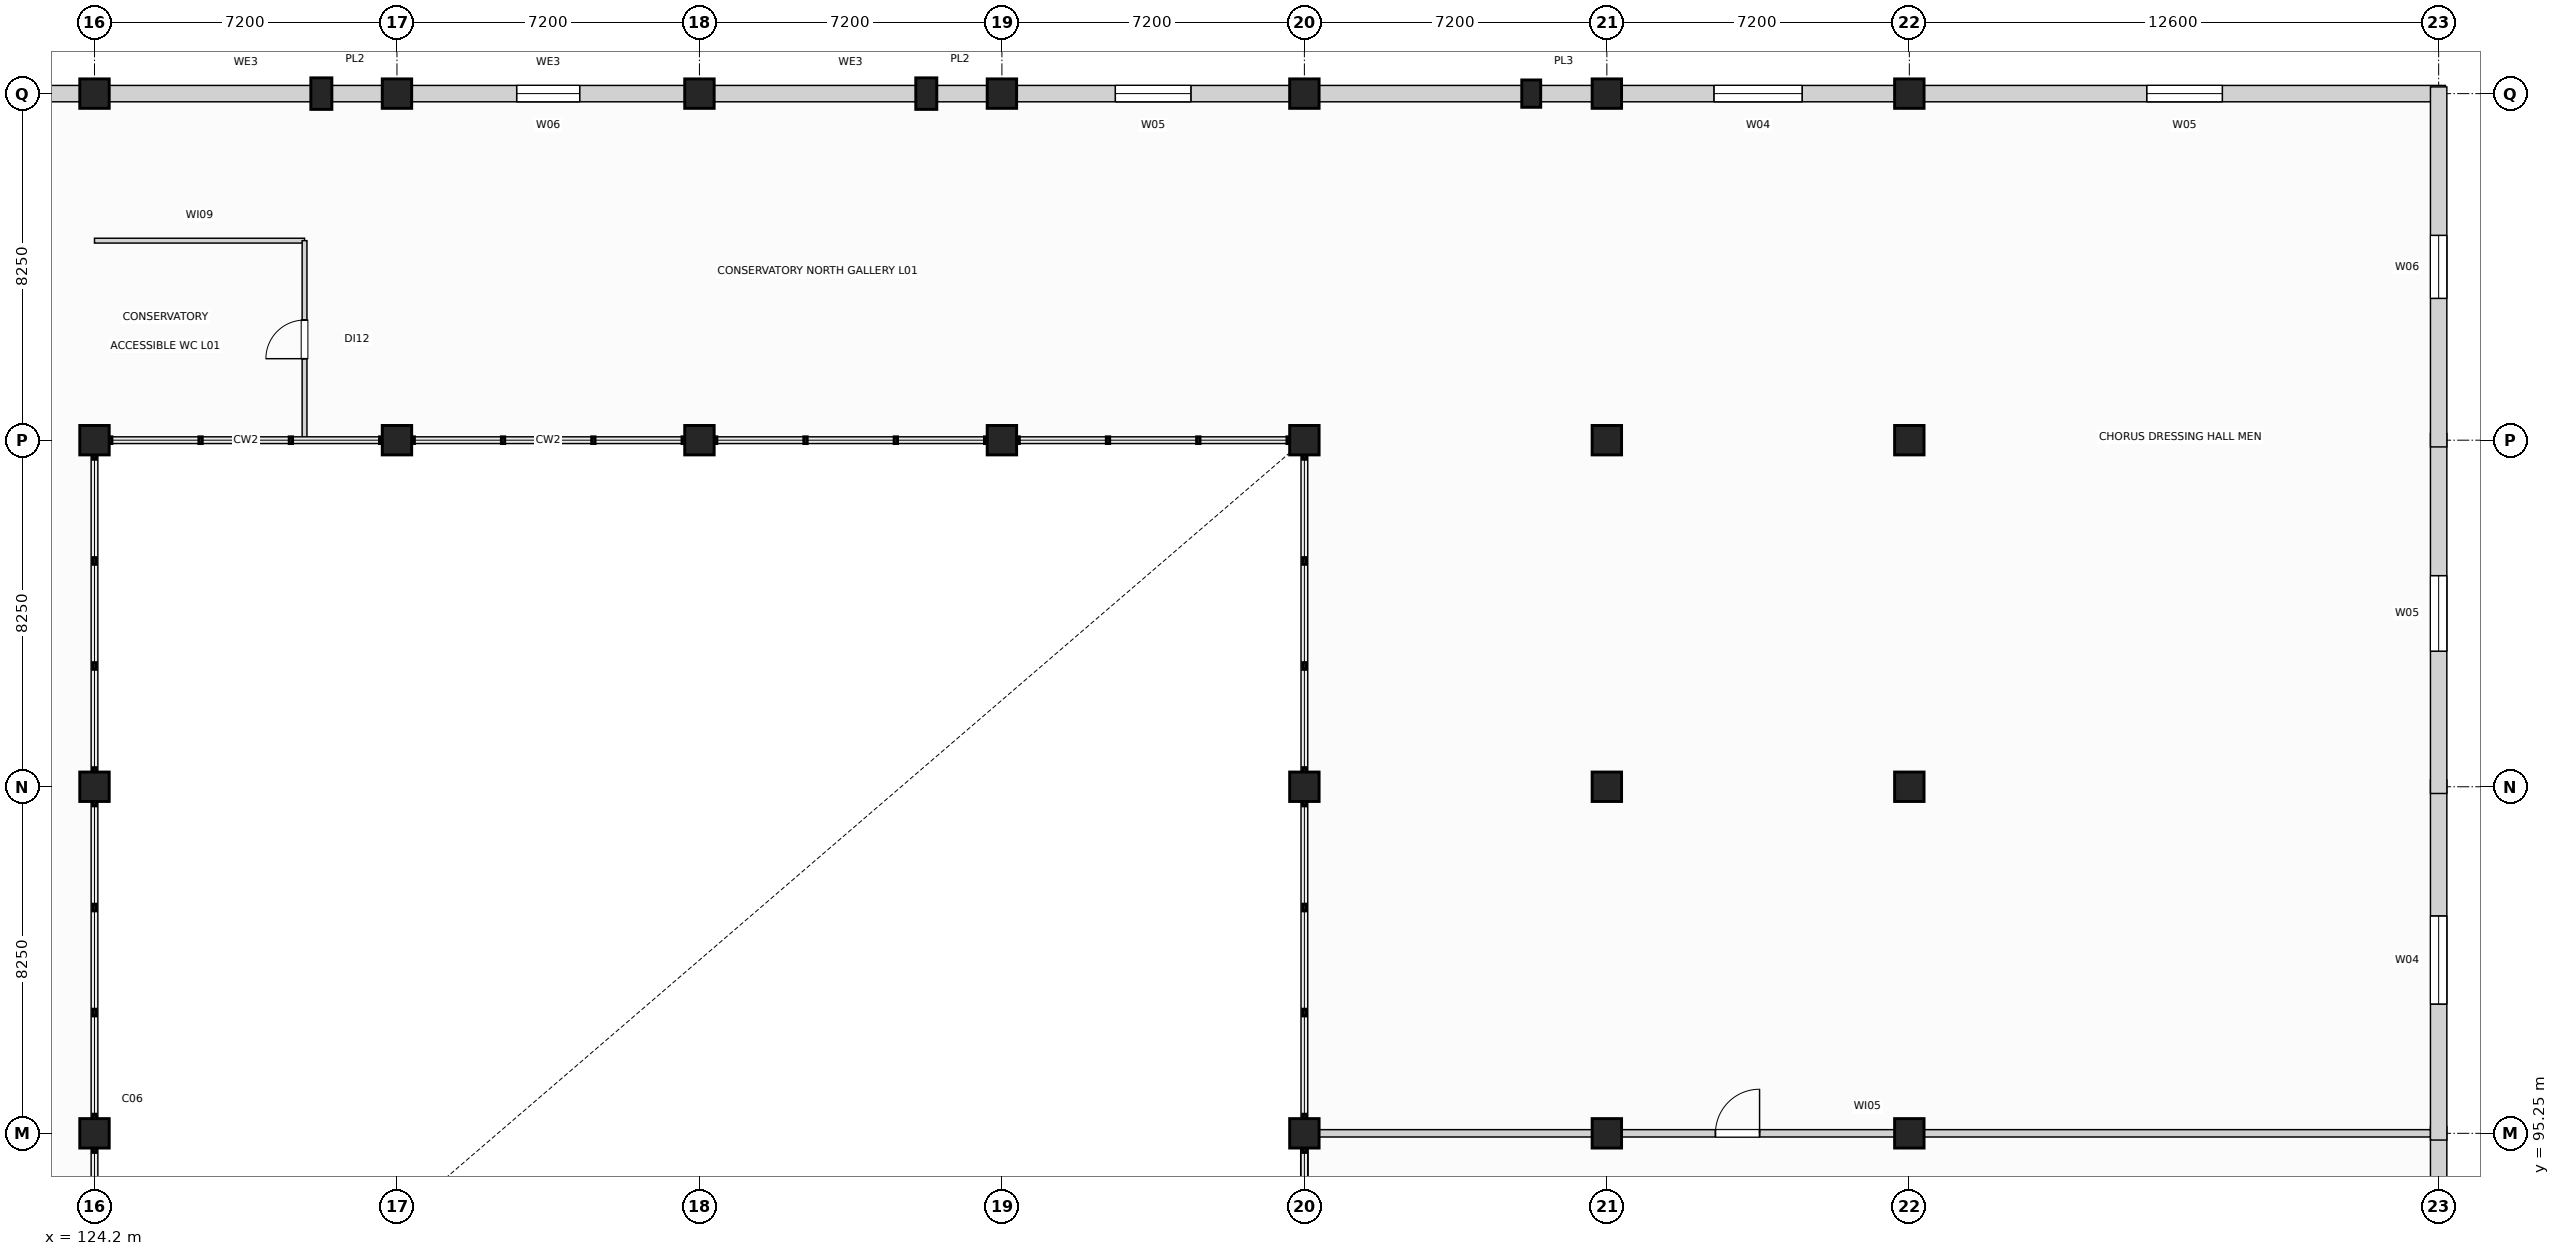
"""IFC4 building model, lengths in metres.
Left out: names, types, materials, properties, quantities, classifications, styles, units other than length and angle.
Written with IfcOpenShell. Run it as: python <this file> out.ifc"""

import sys

from ifc_helpers import new_model, si_unit, direction, frame, frame_2d, origin, origin_2d, place, context, subcontext, project, spatial, rectangle, extrude, element, fill, save


model = new_model("IFC4")
c1 = context("Model", 3, precision=1e-05, world=origin(), true_north=direction((0.0, 1.0)))
c2 = subcontext(c1, "Body", "Model", "MODEL_VIEW")
j1 = project(units=[si_unit("LENGTHUNIT", "METRE"), si_unit("PLANEANGLEUNIT", "RADIAN")], contexts=[c1])
p1 = place(None, origin())
s1 = spatial("IfcSite", under=j1, at=p1, CompositionType="ELEMENT")
p2 = place(p1, origin())
s2 = spatial("IfcBuilding", under=s1, at=p2, CompositionType="ELEMENT")
p3 = place(p2, frame((0.0, 0.0, 6.0)))
s3 = spatial("IfcBuildingStorey", under=s2, at=p3, CompositionType="ELEMENT", Elevation=6.0)
for number, where, z_axis, x_axis in (
    (1, (124.2, 95.25, 0.0), (0.0, 0.0, 1.0), (1.0, 0.0, 0.0)),
    (2, (124.2, 103.5, 0.0), (0.0, 0.0, 1.0), (1.0, 0.0, 0.0)),
    (3, (124.2, 111.75, 0.0), (0.0, 0.0, 1.0), (1.0, 0.0, 0.0)),
    (4, (124.2, 120.0, 0.0), (0.0, 0.0, 1.0), (1.0, 0.0, 0.0)),
    (5, (131.4, 111.75, 0.0), (0.0, 0.0, 1.0), (1.0, 0.0, 0.0)),
    (6, (131.4, 120.0, 0.0), (0.0, 0.0, 1.0), (1.0, 0.0, 0.0)),
    (7, (138.6, 111.75, 0.0), (0.0, 0.0, 1.0), (1.0, 0.0, 0.0)),
    (8, (138.6, 120.0, 0.0), (0.0, 0.0, 1.0), (1.0, 0.0, 0.0)),
    (9, (145.8, 111.75, 0.0), (0.0, 0.0, 1.0), (1.0, 0.0, 0.0)),
    (10, (145.8, 120.0, 0.0), (0.0, 0.0, 1.0), (1.0, 0.0, 0.0)),
    (11, (153.0, 95.25, 0.0), (0.0, 0.0, 1.0), (1.0, 0.0, 0.0)),
    (12, (153.0, 103.5, 0.0), (0.0, 0.0, 1.0), (1.0, 0.0, 0.0)),
    (13, (153.0, 111.75, 0.0), (0.0, 0.0, 1.0), (1.0, 0.0, 0.0)),
    (14, (153.0, 120.0, 0.0), (0.0, 0.0, 1.0), (1.0, 0.0, 0.0)),
    (15, (160.2, 95.25, 0.0), (0.0, 0.0, 1.0), (1.0, 0.0, 0.0)),
    (16, (160.2, 103.5, 0.0), (0.0, 0.0, 1.0), (1.0, 0.0, 0.0)),
    (17, (160.2, 111.75, 0.0), (0.0, 0.0, 1.0), (1.0, 0.0, 0.0)),
    (18, (160.2, 120.0, 0.0), (0.0, 0.0, 1.0), (1.0, 0.0, 0.0)),
    (19, (167.4, 95.25, 0.0), (0.0, 0.0, 1.0), (1.0, 0.0, 0.0)),
    (20, (167.4, 103.5, 0.0), (0.0, 0.0, 1.0), (1.0, 0.0, 0.0)),
    (21, (167.4, 111.75, 0.0), (0.0, 0.0, 1.0), (1.0, 0.0, 0.0)),
    (22, (167.4, 120.0, 0.0), (0.0, 0.0, 1.0), (1.0, 0.0, 0.0)),
):
    element("IfcColumn", number, at=place(p3, frame(where, z_axis=z_axis, x_axis=x_axis)), inside=s3, PredefinedType="COLUMN", context=c2, shape_type="SweptSolid", body=[
        extrude(rectangle(XDim=0.7, YDim=0.7, at=origin_2d()), origin(), (0.0, 0.0, 1.0), 5.4),
    ])
for number, where, z_axis, x_axis in (
    (23, (129.6, 120.0, 0.0), (0.0, 0.0, 1.0), (1.0, 0.0, 0.0)),
    (24, (144.0, 120.0, 0.0), (0.0, 0.0, 1.0), (1.0, 0.0, 0.0)),
):
    element("IfcColumn", number, at=place(p3, frame(where, z_axis=z_axis, x_axis=x_axis)), inside=s3, PredefinedType="PILASTER", context=c2, shape_type="SweptSolid", body=[
        extrude(rectangle(XDim=0.5, YDim=0.75, at=origin_2d()), origin(), (0.0, 0.0, 1.0), 5.05),
    ])
p4 = place(p3, frame((158.4, 120.0, 0.0), z_axis=(0.0, 0.0, 1.0), x_axis=(1.0, 0.0, 0.0)))
e25 = element("IfcColumn", 25, at=p4, inside=s3, PredefinedType="PILASTER", context=c2, shape_type="SweptSolid", body=[
    extrude(rectangle(XDim=0.45, YDim=0.65, at=origin_2d()), origin(), (0.0, 0.0, 1.0), 5.05),
])
p5 = place(p3, frame((117.345, 120.0, 0.0), z_axis=(0.0, 0.0, 1.0), x_axis=(1.0, 0.0, 0.0)))
e26 = element("IfcWall", 26, at=p5, inside=s3, PredefinedType="SOLIDWALL", context=c2, shape_type="SweptSolid", body=[
    extrude(rectangle(XDim=6.51, YDim=0.39, at=frame_2d((3.255, 0.0))), origin(), (0.0, 0.0, 1.0), 4.365),
])
p6 = place(p5, frame((2.205, 0.0, 0.9)))
e27 = element("IfcOpeningElement", 27, at=p6, cuts=e26, PredefinedType="OPENING", context=c2, shape_type="SweptSolid", body=[
    extrude(rectangle(XDim=2.1, YDim=2.5, at=frame_2d((1.05, 1.25))), frame((0.0, 0.205, 0.0), z_axis=(0.0, -1.0, 0.0), x_axis=(1.0, 0.0, 0.0)), (0.0, 0.0, 1.0), 0.41),
])
p7 = place(p3, frame((124.545, 120.0, 0.0), z_axis=(0.0, 0.0, 1.0), x_axis=(1.0, 0.0, 0.0)))
e28 = element("IfcWall", 28, at=p7, inside=s3, PredefinedType="SOLIDWALL", context=c2, shape_type="SweptSolid", body=[
    extrude(rectangle(XDim=6.51, YDim=0.39, at=frame_2d((3.255, 0.0))), origin(), (0.0, 0.0, 1.0), 4.365),
])
p8 = place(p3, frame((131.745, 120.0, 0.0), z_axis=(0.0, 0.0, 1.0), x_axis=(1.0, 0.0, 0.0)))
e29 = element("IfcWall", 29, at=p8, inside=s3, PredefinedType="SOLIDWALL", context=c2, shape_type="SweptSolid", body=[
    extrude(rectangle(XDim=6.51, YDim=0.39, at=frame_2d((3.255, 0.0))), origin(), (0.0, 0.0, 1.0), 4.265),
])
p9 = place(p8, frame((2.505, 0.0, 0.9)))
e30 = element("IfcOpeningElement", 30, at=p9, cuts=e29, PredefinedType="OPENING", context=c2, shape_type="SweptSolid", body=[
    extrude(rectangle(XDim=1.5, YDim=2.05, at=frame_2d((0.75, 1.025))), frame((0.0, 0.205, 0.0), z_axis=(0.0, -1.0, 0.0), x_axis=(1.0, 0.0, 0.0)), (0.0, 0.0, 1.0), 0.41),
])
p10 = place(p3, frame((138.945, 120.0, 0.0), z_axis=(0.0, 0.0, 1.0), x_axis=(1.0, 0.0, 0.0)))
e31 = element("IfcWall", 31, at=p10, inside=s3, PredefinedType="SOLIDWALL", context=c2, shape_type="SweptSolid", body=[
    extrude(rectangle(XDim=6.51, YDim=0.39, at=frame_2d((3.255, 0.0))), origin(), (0.0, 0.0, 1.0), 4.265),
])
p11 = place(p3, frame((146.145, 120.0, 0.0), z_axis=(0.0, 0.0, 1.0), x_axis=(1.0, 0.0, 0.0)))
e32 = element("IfcWall", 32, at=p11, inside=s3, PredefinedType="SOLIDWALL", context=c2, shape_type="SweptSolid", body=[
    extrude(rectangle(XDim=6.51, YDim=0.39, at=frame_2d((3.255, 0.0))), origin(), (0.0, 0.0, 1.0), 4.415),
])
p12 = place(p11, frame((2.355, 0.0, 0.9)))
e33 = element("IfcOpeningElement", 33, at=p12, cuts=e32, PredefinedType="OPENING", context=c2, shape_type="SweptSolid", body=[
    extrude(rectangle(XDim=1.8, YDim=2.3, at=frame_2d((0.9, 1.15))), frame((0.0, 0.205, 0.0), z_axis=(0.0, -1.0, 0.0), x_axis=(1.0, 0.0, 0.0)), (0.0, 0.0, 1.0), 0.41),
])
p13 = place(p3, frame((153.345, 120.0, 0.0), z_axis=(0.0, 0.0, 1.0), x_axis=(1.0, 0.0, 0.0)))
e34 = element("IfcWall", 34, at=p13, inside=s3, PredefinedType="SOLIDWALL", context=c2, shape_type="SweptSolid", body=[
    extrude(rectangle(XDim=6.51, YDim=0.39, at=frame_2d((3.255, 0.0))), origin(), (0.0, 0.0, 1.0), 4.065),
])
p14 = place(p3, frame((160.545, 120.0, 0.0), z_axis=(0.0, 0.0, 1.0), x_axis=(1.0, 0.0, 0.0)))
e35 = element("IfcWall", 35, at=p14, inside=s3, PredefinedType="SOLIDWALL", context=c2, shape_type="SweptSolid", body=[
    extrude(rectangle(XDim=6.51, YDim=0.39, at=frame_2d((3.255, 0.0))), origin(), (0.0, 0.0, 1.0), 4.065),
])
p15 = place(p14, frame((2.205, 0.0, 0.9)))
e36 = element("IfcOpeningElement", 36, at=p15, cuts=e35, PredefinedType="OPENING", context=c2, shape_type="SweptSolid", body=[
    extrude(rectangle(XDim=2.1, YDim=2.5, at=frame_2d((1.05, 1.25))), frame((0.0, 0.205, 0.0), z_axis=(0.0, -1.0, 0.0), x_axis=(1.0, 0.0, 0.0)), (0.0, 0.0, 1.0), 0.41),
])
p16 = place(p3, frame((167.745, 120.0, 0.0), z_axis=(0.0, 0.0, 1.0), x_axis=(1.0, 0.0, 0.0)))
e37 = element("IfcWall", 37, at=p16, inside=s3, PredefinedType="SOLIDWALL", context=c2, shape_type="SweptSolid", body=[
    extrude(rectangle(XDim=12.415, YDim=0.39, at=frame_2d((6.208, 0.0))), origin(), (0.0, 0.0, 1.0), 4.065),
])
p17 = place(p16, frame((5.307, 0.0, 0.9)))
e38 = element("IfcOpeningElement", 38, at=p17, cuts=e37, PredefinedType="OPENING", context=c2, shape_type="SweptSolid", body=[
    extrude(rectangle(XDim=1.8, YDim=2.3, at=frame_2d((0.9, 1.15))), frame((0.0, 0.205, 0.0), z_axis=(0.0, -1.0, 0.0), x_axis=(1.0, 0.0, 0.0)), (0.0, 0.0, 1.0), 0.41),
])
p18 = place(p3, frame((180.0, 95.41, 0.0), z_axis=(0.0, 0.0, 1.0), x_axis=(0.0, -1.0, 0.0)))
e39 = element("IfcWall", 39, at=p18, inside=s3, PredefinedType="SOLIDWALL", context=c2, shape_type="SweptSolid", body=[
    extrude(rectangle(XDim=8.57, YDim=0.39, at=frame_2d((4.285, 0.0))), origin(), (0.0, 0.0, 1.0), 5.015),
])
p19 = place(p18, frame((3.535, 0.0, 0.9)))
e40 = element("IfcOpeningElement", 40, at=p19, cuts=e39, PredefinedType="OPENING", context=c2, shape_type="SweptSolid", body=[
    extrude(rectangle(XDim=1.5, YDim=2.05, at=frame_2d((0.75, 1.025))), frame((0.0, 0.205, 0.0), z_axis=(0.0, -1.0, 0.0), x_axis=(1.0, 0.0, 0.0)), (0.0, 0.0, 1.0), 0.41),
])
p20 = place(p3, frame((180.0, 103.66, 0.0), z_axis=(0.0, 0.0, 1.0), x_axis=(0.0, -1.0, 0.0)))
e41 = element("IfcWall", 41, at=p20, inside=s3, PredefinedType="SOLIDWALL", context=c2, shape_type="SweptSolid", body=[
    extrude(rectangle(XDim=8.57, YDim=0.39, at=frame_2d((4.285, 0.0))), origin(), (0.0, 0.0, 1.0), 5.015),
])
p21 = place(p20, frame((3.235, 0.0, 0.9)))
e42 = element("IfcOpeningElement", 42, at=p21, cuts=e41, PredefinedType="OPENING", context=c2, shape_type="SweptSolid", body=[
    extrude(rectangle(XDim=2.1, YDim=2.5, at=frame_2d((1.05, 1.25))), frame((0.0, 0.205, 0.0), z_axis=(0.0, -1.0, 0.0), x_axis=(1.0, 0.0, 0.0)), (0.0, 0.0, 1.0), 0.41),
])
p22 = place(p3, frame((180.0, 111.91, 0.0), z_axis=(0.0, 0.0, 1.0), x_axis=(0.0, -1.0, 0.0)))
e43 = element("IfcWall", 43, at=p22, inside=s3, PredefinedType="SOLIDWALL", context=c2, shape_type="SweptSolid", body=[
    extrude(rectangle(XDim=8.57, YDim=0.39, at=frame_2d((4.285, 0.0))), origin(), (0.0, 0.0, 1.0), 5.015),
])
p23 = place(p22, frame((3.385, 0.0, 0.9)))
e44 = element("IfcOpeningElement", 44, at=p23, cuts=e43, PredefinedType="OPENING", context=c2, shape_type="SweptSolid", body=[
    extrude(rectangle(XDim=1.8, YDim=2.3, at=frame_2d((0.9, 1.15))), frame((0.0, 0.205, 0.0), z_axis=(0.0, -1.0, 0.0), x_axis=(1.0, 0.0, 0.0)), (0.0, 0.0, 1.0), 0.41),
])
p24 = place(p3, frame((180.0, 120.16, 0.0), z_axis=(0.0, 0.0, 1.0), x_axis=(0.0, -1.0, 0.0)))
e45 = element("IfcWall", 45, at=p24, inside=s3, PredefinedType="SOLIDWALL", context=c2, shape_type="SweptSolid", body=[
    extrude(rectangle(XDim=8.57, YDim=0.39, at=frame_2d((4.285, 0.0))), origin(), (0.0, 0.0, 1.0), 5.015),
])
p25 = place(p24, frame((3.535, 0.0, 0.9)))
e46 = element("IfcOpeningElement", 46, at=p25, cuts=e45, PredefinedType="OPENING", context=c2, shape_type="SweptSolid", body=[
    extrude(rectangle(XDim=1.5, YDim=2.05, at=frame_2d((0.75, 1.025))), frame((0.0, 0.205, 0.0), z_axis=(0.0, -1.0, 0.0), x_axis=(1.0, 0.0, 0.0)), (0.0, 0.0, 1.0), 0.41),
])
p26 = place(p3, frame((153.0, 69.2, 0.0), z_axis=(0.0, 0.0, 1.0), x_axis=(0.0, 1.0, 0.0)))
e47 = element("IfcWall", 47, at=p26, inside=s3, PredefinedType="PARTITIONING", context=c2, shape_type="SweptSolid", body=[
    extrude(rectangle(XDim=26.05, YDim=0.175, at=frame_2d((13.025, 0.0))), origin(), (0.0, 0.0, 1.0), 4.315),
])
p27 = place(p26, frame((12.5, 0.0, 0.0)))
e48 = element("IfcOpeningElement", 48, at=p27, cuts=e47, PredefinedType="OPENING", context=c2, shape_type="SweptSolid", body=[
    extrude(rectangle(XDim=1.05, YDim=2.12, at=frame_2d((0.525, 1.06))), frame((0.0, 0.097, 0.0), z_axis=(0.0, -1.0, 0.0), x_axis=(1.0, 0.0, 0.0)), (0.0, 0.0, 1.0), 0.195),
])
p28 = place(p3, frame((153.0, 95.25, 0.0), z_axis=(0.0, 0.0, 1.0), x_axis=(1.0, 0.0, 0.0)))
e49 = element("IfcWall", 49, at=p28, inside=s3, PredefinedType="PARTITIONING", context=c2, shape_type="SweptSolid", body=[
    extrude(rectangle(XDim=26.8, YDim=0.175, at=frame_2d((13.4, 0.0))), origin(), (0.0, 0.0, 1.0), 4.365),
])
p29 = place(p28, frame((9.785, 0.0, 0.0)))
e50 = element("IfcOpeningElement", 50, at=p29, cuts=e49, PredefinedType="OPENING", context=c2, shape_type="SweptSolid", body=[
    extrude(rectangle(XDim=1.05, YDim=2.12, at=frame_2d((0.525, 1.06))), frame((0.0, 0.097, 0.0), z_axis=(0.0, -1.0, 0.0), x_axis=(1.0, 0.0, 0.0)), (0.0, 0.0, 1.0), 0.195),
])
p30 = place(p3, frame((124.2, 116.5, 0.0), z_axis=(0.0, 0.0, 1.0), x_axis=(1.0, 0.0, 0.0)))
e51 = element("IfcWall", 51, at=p30, inside=s3, PredefinedType="PARTITIONING", context=c2, shape_type="SweptSolid", body=[
    extrude(rectangle(XDim=5.0, YDim=0.115, at=frame_2d((2.5, 0.0))), origin(), (0.0, 0.0, 1.0), 4.365),
])
p31 = place(p3, frame((129.2, 111.8, 0.0), z_axis=(0.0, 0.0, 1.0), x_axis=(0.0, 1.0, 0.0)))
e52 = element("IfcWall", 52, at=p31, inside=s3, PredefinedType="PARTITIONING", context=c2, shape_type="SweptSolid", body=[
    extrude(rectangle(XDim=4.7, YDim=0.115, at=frame_2d((2.35, 0.0))), origin(), (0.0, 0.0, 1.0), 4.515),
])
p32 = place(p31, frame((1.89, 0.0, 0.0)))
e53 = element("IfcOpeningElement", 53, at=p32, cuts=e52, PredefinedType="OPENING", context=c2, shape_type="SweptSolid", body=[
    extrude(rectangle(XDim=0.92, YDim=2.08, at=frame_2d((0.46, 1.04))), frame((0.0, 0.067, 0.0), z_axis=(0.0, -1.0, 0.0), x_axis=(1.0, 0.0, 0.0)), (0.0, 0.0, 1.0), 0.135),
])
p33 = place(p9, origin())
e54 = element("IfcWindow", 54, at=p33, inside=s3, PartitioningType="SINGLE_PANEL", PredefinedType="WINDOW", context=c2, shape_type="SweptSolid", body=[
    extrude(rectangle(XDim=1.5, YDim=2.05, at=frame_2d((0.75, 1.025))), frame((0.0, 0.03, 0.0), z_axis=(0.0, -1.0, 0.0), x_axis=(1.0, 0.0, 0.0)), (0.0, 0.0, 1.0), 0.06),
])
fill(e30, e54)
p34 = place(p12, origin())
e55 = element("IfcWindow", 55, at=p34, inside=s3, PartitioningType="SINGLE_PANEL", PredefinedType="WINDOW", context=c2, shape_type="SweptSolid", body=[
    extrude(rectangle(XDim=1.8, YDim=2.3, at=frame_2d((0.9, 1.15))), frame((0.0, 0.03, 0.0), z_axis=(0.0, -1.0, 0.0), x_axis=(1.0, 0.0, 0.0)), (0.0, 0.0, 1.0), 0.06),
])
fill(e33, e55)
p35 = place(p15, origin())
e56 = element("IfcWindow", 56, at=p35, inside=s3, PartitioningType="SINGLE_PANEL", PredefinedType="WINDOW", context=c2, shape_type="SweptSolid", body=[
    extrude(rectangle(XDim=2.1, YDim=2.5, at=frame_2d((1.05, 1.25))), frame((0.0, 0.03, 0.0), z_axis=(0.0, -1.0, 0.0), x_axis=(1.0, 0.0, 0.0)), (0.0, 0.0, 1.0), 0.06),
])
fill(e36, e56)
p36 = place(p17, origin())
e57 = element("IfcWindow", 57, at=p36, inside=s3, PartitioningType="SINGLE_PANEL", PredefinedType="WINDOW", context=c2, shape_type="SweptSolid", body=[
    extrude(rectangle(XDim=1.8, YDim=2.3, at=frame_2d((0.9, 1.15))), frame((0.0, 0.03, 0.0), z_axis=(0.0, -1.0, 0.0), x_axis=(1.0, 0.0, 0.0)), (0.0, 0.0, 1.0), 0.06),
])
fill(e38, e57)
p37 = place(p21, origin())
e58 = element("IfcWindow", 58, at=p37, inside=s3, PartitioningType="SINGLE_PANEL", PredefinedType="WINDOW", context=c2, shape_type="SweptSolid", body=[
    extrude(rectangle(XDim=2.1, YDim=2.5, at=frame_2d((1.05, 1.25))), frame((0.0, 0.03, 0.0), z_axis=(0.0, -1.0, 0.0), x_axis=(1.0, 0.0, 0.0)), (0.0, 0.0, 1.0), 0.06),
])
fill(e42, e58)
p38 = place(p23, origin())
e59 = element("IfcWindow", 59, at=p38, inside=s3, PartitioningType="SINGLE_PANEL", PredefinedType="WINDOW", context=c2, shape_type="SweptSolid", body=[
    extrude(rectangle(XDim=1.8, YDim=2.3, at=frame_2d((0.9, 1.15))), frame((0.0, 0.03, 0.0), z_axis=(0.0, -1.0, 0.0), x_axis=(1.0, 0.0, 0.0)), (0.0, 0.0, 1.0), 0.06),
])
fill(e44, e59)
p39 = place(p25, origin())
e60 = element("IfcWindow", 60, at=p39, inside=s3, PartitioningType="SINGLE_PANEL", PredefinedType="WINDOW", context=c2, shape_type="SweptSolid", body=[
    extrude(rectangle(XDim=1.5, YDim=2.05, at=frame_2d((0.75, 1.025))), frame((0.0, 0.03, 0.0), z_axis=(0.0, -1.0, 0.0), x_axis=(1.0, 0.0, 0.0)), (0.0, 0.0, 1.0), 0.06),
])
fill(e46, e60)
p40 = place(p29, origin())
e61 = element("IfcDoor", 61, at=p40, inside=s3, OperationType="SINGLE_SWING_RIGHT", PredefinedType="DOOR", context=c2, shape_type="SweptSolid", body=[
    extrude(rectangle(XDim=1.05, YDim=2.12, at=frame_2d((0.525, 1.06))), frame((0.0, 0.025, 0.0), z_axis=(0.0, -1.0, 0.0), x_axis=(1.0, 0.0, 0.0)), (0.0, 0.0, 1.0), 0.05),
])
fill(e50, e61)
p41 = place(p32, origin())
e62 = element("IfcDoor", 62, at=p41, inside=s3, OperationType="SINGLE_SWING_LEFT", PredefinedType="DOOR", context=c2, shape_type="SweptSolid", body=[
    extrude(rectangle(XDim=0.92, YDim=2.08, at=frame_2d((0.46, 1.04))), frame((0.0, 0.025, 0.0), z_axis=(0.0, -1.0, 0.0), x_axis=(1.0, 0.0, 0.0)), (0.0, 0.0, 1.0), 0.05),
])
fill(e53, e62)
save(model, sys.argv[1])
